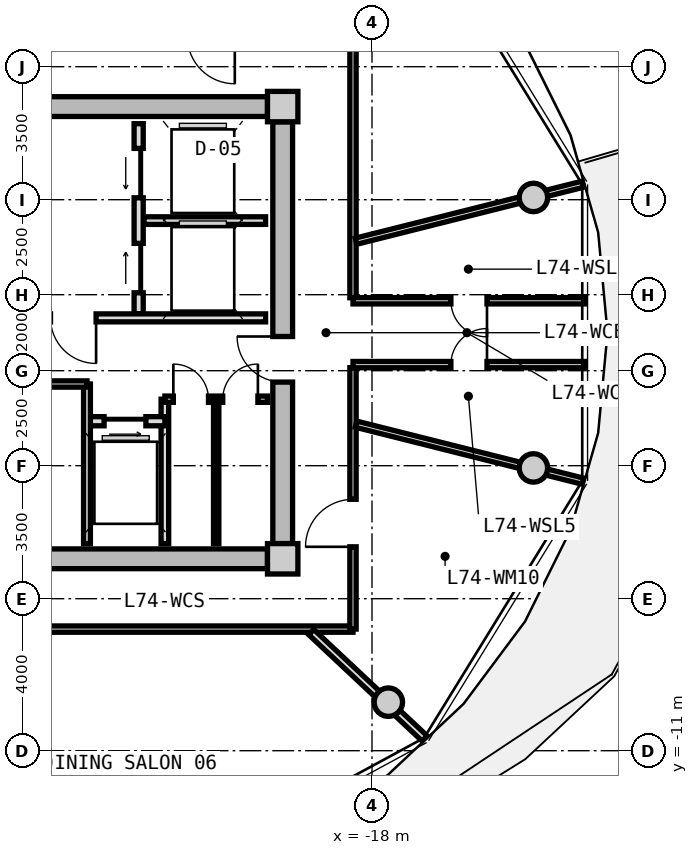
"""IFC4 building model, lengths in metres.
Left out: names, types, materials, properties, quantities, classifications, styles, units other than length and angle.
Written with IfcOpenShell. Run it as: python <this file> out.ifc"""

import sys

from ifc_helpers import new_model, si_unit, direction, frame, frame_2d, origin, origin_2d, place, context, subcontext, project, spatial, rectangle, circle, extrude, source, transform, mapped, element, fill, save


model = new_model("IFC4")
c1 = context("Model", 3, precision=1e-05, world=origin(), true_north=direction((0.0, 1.0)))
c2 = subcontext(c1, "Body", "Model", "MODEL_VIEW")
j1 = project(units=[si_unit("LENGTHUNIT", "METRE"), si_unit("PLANEANGLEUNIT", "RADIAN")], contexts=[c1])
p1 = place(None, origin())
s1 = spatial("IfcSite", under=j1, at=p1, CompositionType="ELEMENT")
p2 = place(p1, origin())
s2 = spatial("IfcBuilding", under=s1, at=p2, CompositionType="ELEMENT")
p3 = place(p2, frame((0.0, 0.0, 238.3)))
s3 = spatial("IfcBuildingStorey", under=s2, at=p3, CompositionType="ELEMENT", Elevation=238.3)
m1 = source(origin(), c2, "Body", "SweptSolid", [
    extrude(rectangle(XDim=0.8, YDim=0.8, at=origin_2d()), origin(), (0.0, 0.0, 1.0), 3.05),
])
for number, where, z_axis, x_axis in (
    (1, (-20.35, -5.95, 0.0), (0.0, 0.0, 1.0), (1.0, 0.0, 0.0)),
    (2, (-20.35, 5.95, 0.0), (0.0, 0.0, 1.0), (1.0, 0.0, 0.0)),
):
    element("IfcColumn", number, at=place(p3, frame(where, z_axis=z_axis, x_axis=x_axis)), inside=s3, PredefinedType="COLUMN", context=c2, shape_type="MappedRepresentation", body=[
        mapped(m1, transform((0.0, 0.0, 0.0), x_axis=(1.0, 0.0, 0.0), y_axis=(0.0, 1.0, 0.0), z_axis=(0.0, 0.0, 1.0), scale=1.0)),
    ])
m2 = source(origin(), c2, "Body", "SweptSolid", [
    extrude(rectangle(XDim=14.5, YDim=0.52, at=frame_2d((7.25, 0.0))), origin(), (0.0, 0.0, 1.0), 2.81),
])
for number, where, z_axis, x_axis in (
    (3, (-35.25, 5.95, 0.0), (0.0, 0.0, 1.0), (1.0, 0.0, 0.0)),
    (4, (-20.75, -5.95, 0.0), (0.0, 0.0, 1.0), (-1.0, 0.0, 0.0)),
):
    element("IfcWall", number, at=place(p3, frame(where, z_axis=z_axis, x_axis=x_axis)), inside=s3, PredefinedType="SHEAR", context=c2, shape_type="MappedRepresentation", body=[
        mapped(m2, transform((0.0, 0.0, 0.0), x_axis=(1.0, 0.0, 0.0), y_axis=(0.0, 1.0, 0.0), z_axis=(0.0, 0.0, 1.0), scale=1.0)),
    ])
m3 = source(origin(), c2, "Body", "SweptSolid", [
    extrude(rectangle(XDim=11.1, YDim=0.52, at=frame_2d((5.55, 0.0))), origin(), (0.0, 0.0, 1.0), 2.81),
])
p4 = place(p3, frame((-20.35, 5.55, 0.0), z_axis=(0.0, 0.0, 1.0), x_axis=(0.0, -1.0, 0.0)))
e5 = element("IfcWall", 5, at=p4, inside=s3, PredefinedType="SHEAR", context=c2, shape_type="MappedRepresentation", body=[
    mapped(m3, transform((0.0, 0.0, 0.0), x_axis=(1.0, 0.0, 0.0), y_axis=(0.0, 1.0, 0.0), z_axis=(0.0, 0.0, 1.0), scale=1.0)),
])
p5 = place(p4, frame((5.65, 0.0, 0.0)))
e6 = element("IfcOpeningElement", 6, at=p5, cuts=e5, PredefinedType="OPENING", context=c2, shape_type="SweptSolid", body=[
    extrude(rectangle(XDim=1.2, YDim=2.15, at=frame_2d((0.6, 1.075))), frame((0.0, 0.27, 0.0), z_axis=(0.0, -1.0, 0.0), x_axis=(1.0, 0.0, 0.0)), (0.0, 0.0, 1.0), 0.54),
])
m4 = source(origin(), c2, "Body", "SweptSolid", [
    extrude(circle(Radius=0.375, at=origin_2d()), origin(), (0.0, 0.0, 1.0), 3.05),
])
for number, where, z_axis, x_axis in (
    (7, (-13.753, 3.559, 0.0), (0.0, 0.0, 1.0), (1.0, 0.0, 0.0)),
    (8, (-17.57, -9.723, 0.0), (0.0, 0.0, 1.0), (1.0, 0.0, 0.0)),
    (9, (-13.753, -3.559, 0.0), (0.0, 0.0, 1.0), (1.0, 0.0, 0.0)),
):
    element("IfcColumn", number, at=place(p3, frame(where, z_axis=z_axis, x_axis=x_axis)), inside=s3, PredefinedType="COLUMN", context=c2, shape_type="MappedRepresentation", body=[
        mapped(m4, transform((0.0, 0.0, 0.0), x_axis=(1.0, 0.0, 0.0), y_axis=(0.0, 1.0, 0.0), z_axis=(0.0, 0.0, 1.0), scale=1.0)),
    ])
m5 = source(origin(), c2, "Body", "SweptSolid", [
    extrude(rectangle(XDim=5.0, YDim=0.24, at=frame_2d((2.5, 0.0))), origin(), (0.0, 0.0, 1.0), 2.795),
])
p6 = place(p3, frame((-24.14, 0.5, 0.0), z_axis=(0.0, 0.0, 1.0), x_axis=(0.0, 1.0, 0.0)))
e10 = element("IfcWall", 10, at=p6, inside=s3, PredefinedType="PARTITIONING", context=c2, shape_type="MappedRepresentation", body=[
    mapped(m5, transform((0.0, 0.0, 0.0), x_axis=(1.0, 0.0, 0.0), y_axis=(0.0, 1.0, 0.0), z_axis=(0.0, 0.0, 1.0), scale=1.0)),
])
p7 = place(p6, frame((3.05, 0.0, 0.0)))
e11 = element("IfcOpeningElement", 11, at=p7, cuts=e10, PredefinedType="OPENING", context=c2, shape_type="SweptSolid", body=[
    extrude(rectangle(XDim=1.3, YDim=2.2, at=frame_2d((0.65, 1.1))), frame((0.0, 0.13, 0.0), z_axis=(0.0, -1.0, 0.0), x_axis=(1.0, 0.0, 0.0)), (0.0, 0.0, 1.0), 0.26),
])
p8 = place(p6, frame((0.55, 0.0, 0.0)))
e12 = element("IfcOpeningElement", 12, at=p8, cuts=e10, PredefinedType="OPENING", context=c2, shape_type="SweptSolid", body=[
    extrude(rectangle(XDim=1.3, YDim=2.2, at=frame_2d((0.65, 1.1))), frame((0.0, 0.13, 0.0), z_axis=(0.0, -1.0, 0.0), x_axis=(1.0, 0.0, 0.0)), (0.0, 0.0, 1.0), 0.26),
])
m6 = source(origin(), c2, "Body", "SweptSolid", [
    extrude(rectangle(XDim=3.2, YDim=0.2, at=frame_2d((1.6, 0.0))), origin(), (0.0, 0.0, 1.0), 2.795),
])
p9 = place(p3, frame((-24.0, 2.95, 0.0), z_axis=(0.0, 0.0, 1.0), x_axis=(1.0, 0.0, 0.0)))
e13 = element("IfcWall", 13, at=p9, inside=s3, PredefinedType="PARTITIONING", context=c2, shape_type="MappedRepresentation", body=[
    mapped(m6, transform((0.0, 0.0, 0.0), x_axis=(1.0, 0.0, 0.0), y_axis=(0.0, 1.0, 0.0), z_axis=(0.0, 0.0, 1.0), scale=1.0)),
])
m7 = source(origin(), c2, "Body", "SweptSolid", [
    extrude(rectangle(XDim=6.66, YDim=0.21, at=frame_2d((3.33, 0.0))), origin(), (0.0, 0.0, 1.0), 2.795),
])
p10 = place(p3, frame((-27.46, 0.39, 0.0), z_axis=(0.0, 0.0, 1.0), x_axis=(1.0, 0.0, 0.0)))
e14 = element("IfcWall", 14, at=p10, inside=s3, PredefinedType="PARTITIONING", context=c2, shape_type="MappedRepresentation", body=[
    mapped(m7, transform((0.0, 0.0, 0.0), x_axis=(1.0, 0.0, 0.0), y_axis=(0.0, 1.0, 0.0), z_axis=(0.0, 0.0, 1.0), scale=1.0)),
])
p11 = place(p10, frame((1.0, 0.0, 0.0)))
e15 = element("IfcOpeningElement", 15, at=p11, cuts=e14, PredefinedType="OPENING", context=c2, shape_type="SweptSolid", body=[
    extrude(rectangle(XDim=1.2, YDim=2.15, at=frame_2d((0.6, 1.075))), frame((0.0, 0.115, 0.0), z_axis=(0.0, -1.0, 0.0), x_axis=(1.0, 0.0, 0.0)), (0.0, 0.0, 1.0), 0.23),
])
m8 = source(origin(), c2, "Body", "SweptSolid", [
    extrude(rectangle(XDim=3.8, YDim=0.2, at=frame_2d((1.9, 0.0))), origin(), (0.0, 0.0, 1.0), 2.795),
])
p12 = place(p3, frame((-23.45, -5.55, 0.0), z_axis=(0.0, 0.0, 1.0), x_axis=(0.0, 1.0, 0.0)))
e16 = element("IfcWall", 16, at=p12, inside=s3, PredefinedType="PARTITIONING", context=c2, shape_type="MappedRepresentation", body=[
    mapped(m8, transform((0.0, 0.0, 0.0), x_axis=(1.0, 0.0, 0.0), y_axis=(0.0, 1.0, 0.0), z_axis=(0.0, 0.0, 1.0), scale=1.0)),
])
m9 = source(origin(), c2, "Body", "SweptSolid", [
    extrude(rectangle(XDim=2.05, YDim=0.24, at=frame_2d((1.025, 0.0))), origin(), (0.0, 0.0, 1.0), 2.795),
])
p13 = place(p3, frame((-25.5, -2.33, 0.0), z_axis=(0.0, 0.0, 1.0), x_axis=(1.0, 0.0, 0.0)))
e17 = element("IfcWall", 17, at=p13, inside=s3, PredefinedType="PARTITIONING", context=c2, shape_type="MappedRepresentation", body=[
    mapped(m9, transform((0.0, 0.0, 0.0), x_axis=(1.0, 0.0, 0.0), y_axis=(0.0, 1.0, 0.0), z_axis=(0.0, 0.0, 1.0), scale=1.0)),
])
p14 = place(p13, frame((0.45, 0.0, 0.0)))
e18 = element("IfcOpeningElement", 18, at=p14, cuts=e17, PredefinedType="OPENING", context=c2, shape_type="SweptSolid", body=[
    extrude(rectangle(XDim=1.1, YDim=2.2, at=frame_2d((0.55, 1.1))), frame((0.0, 0.13, 0.0), z_axis=(0.0, -1.0, 0.0), x_axis=(1.0, 0.0, 0.0)), (0.0, 0.0, 1.0), 0.26),
])
m10 = source(origin(), c2, "Body", "SweptSolid", [
    extrude(rectangle(XDim=4.2, YDim=0.18, at=frame_2d((2.1, 0.0))), origin(), (0.0, 0.0, 1.0), 2.795),
])
p15 = place(p3, frame((-25.5, -5.55, 0.0), z_axis=(0.0, 0.0, 1.0), x_axis=(0.0, 1.0, 0.0)))
e19 = element("IfcWall", 19, at=p15, inside=s3, PredefinedType="PARTITIONING", context=c2, shape_type="MappedRepresentation", body=[
    mapped(m10, transform((0.0, 0.0, 0.0), x_axis=(1.0, 0.0, 0.0), y_axis=(0.0, 1.0, 0.0), z_axis=(0.0, 0.0, 1.0), scale=1.0)),
])
m11 = source(origin(), c2, "Body", "SweptSolid", [
    extrude(rectangle(XDim=4.77, YDim=0.165, at=frame_2d((2.385, 0.0))), origin(), (0.0, 0.0, 1.0), 2.795),
])
p16 = place(p3, frame((-30.27, -1.35, 0.0), z_axis=(0.0, 0.0, 1.0), x_axis=(1.0, 0.0, 0.0)))
e20 = element("IfcWall", 20, at=p16, inside=s3, PredefinedType="PARTITIONING", context=c2, shape_type="MappedRepresentation", body=[
    mapped(m11, transform((0.0, 0.0, 0.0), x_axis=(1.0, 0.0, 0.0), y_axis=(0.0, 1.0, 0.0), z_axis=(0.0, 0.0, 1.0), scale=1.0)),
])
p17 = place(p16, frame((1.85, 0.0, 0.0)))
e21 = element("IfcOpeningElement", 21, at=p17, cuts=e20, PredefinedType="OPENING", context=c2, shape_type="SweptSolid", body=[
    extrude(rectangle(XDim=1.0, YDim=2.1, at=frame_2d((0.5, 1.05))), frame((0.0, 0.093, 0.0), z_axis=(0.0, -1.0, 0.0), x_axis=(1.0, 0.0, 0.0)), (0.0, 0.0, 1.0), 0.185),
])
m12 = source(origin(), c2, "Body", "SweptSolid", [
    extrude(rectangle(XDim=2.7, YDim=0.165, at=frame_2d((1.35, 0.0))), origin(), (0.0, 0.0, 1.0), 2.795),
])
p18 = place(p3, frame((-23.45, -1.75, 0.0), z_axis=(0.0, 0.0, 1.0), x_axis=(1.0, 0.0, 0.0)))
e22 = element("IfcWall", 22, at=p18, inside=s3, PredefinedType="PARTITIONING", context=c2, shape_type="MappedRepresentation", body=[
    mapped(m12, transform((0.0, 0.0, 0.0), x_axis=(1.0, 0.0, 0.0), y_axis=(0.0, 1.0, 0.0), z_axis=(0.0, 0.0, 1.0), scale=1.0)),
])
p19 = place(p18, frame((0.222, 0.0, 0.0)))
e23 = element("IfcOpeningElement", 23, at=p19, cuts=e22, PredefinedType="OPENING", context=c2, shape_type="SweptSolid", body=[
    extrude(rectangle(XDim=0.925, YDim=2.1, at=frame_2d((0.462, 1.05))), frame((0.0, 0.093, 0.0), z_axis=(0.0, -1.0, 0.0), x_axis=(1.0, 0.0, 0.0)), (0.0, 0.0, 1.0), 0.185),
])
p20 = place(p18, frame((1.522, 0.0, 0.0)))
e24 = element("IfcOpeningElement", 24, at=p20, cuts=e22, PredefinedType="OPENING", context=c2, shape_type="SweptSolid", body=[
    extrude(rectangle(XDim=0.925, YDim=2.1, at=frame_2d((0.462, 1.05))), frame((0.0, 0.093, 0.0), z_axis=(0.0, -1.0, 0.0), x_axis=(1.0, 0.0, 0.0)), (0.0, 0.0, 1.0), 0.185),
])
m13 = source(origin(), c2, "Body", "SweptSolid", [
    extrude(rectangle(XDim=3.8, YDim=0.14, at=frame_2d((1.9, 0.0))), origin(), (0.0, 0.0, 1.0), 2.795),
])
p21 = place(p3, frame((-22.1, -5.55, 0.0), z_axis=(0.0, 0.0, 1.0), x_axis=(0.0, 1.0, 0.0)))
e25 = element("IfcWall", 25, at=p21, inside=s3, PredefinedType="PARTITIONING", context=c2, shape_type="MappedRepresentation", body=[
    mapped(m13, transform((0.0, 0.0, 0.0), x_axis=(1.0, 0.0, 0.0), y_axis=(0.0, 1.0, 0.0), z_axis=(0.0, 0.0, 1.0), scale=1.0)),
])
m14 = source(origin(), c2, "Body", "SweptSolid", [
    extrude(rectangle(XDim=19.0, YDim=0.165, at=frame_2d((9.5, 0.0))), origin(), (0.0, 0.0, 1.0), 2.795),
])
p22 = place(p3, frame((-18.5, -7.8, 0.0), z_axis=(0.0, 0.0, 1.0), x_axis=(-1.0, 0.0, 0.0)))
e26 = element("IfcWall", 26, at=p22, inside=s3, PredefinedType="PARTITIONING", context=c2, shape_type="MappedRepresentation", body=[
    mapped(m14, transform((0.0, 0.0, 0.0), x_axis=(1.0, 0.0, 0.0), y_axis=(0.0, 1.0, 0.0), z_axis=(0.0, 0.0, 1.0), scale=1.0)),
])
p23 = place(p22, frame((9.292, 0.0, 0.0)))
e27 = element("IfcOpeningElement", 27, at=p23, cuts=e26, PredefinedType="OPENING", context=c2, shape_type="SweptSolid", body=[
    extrude(rectangle(XDim=1.25, YDim=2.2, at=frame_2d((0.625, 1.1))), frame((0.0, 0.093, 0.0), z_axis=(0.0, -1.0, 0.0), x_axis=(1.0, 0.0, 0.0)), (0.0, 0.0, 1.0), 0.185),
])
m15 = source(origin(), c2, "Body", "SweptSolid", [
    extrude(rectangle(XDim=6.88, YDim=0.165, at=frame_2d((3.44, 0.0))), origin(), (0.0, 0.0, 1.0), 2.795),
])
p24 = place(p3, frame((-18.5, 7.8, 0.0), z_axis=(0.0, 0.0, 1.0), x_axis=(0.0, -1.0, 0.0)))
e28 = element("IfcWall", 28, at=p24, inside=s3, PredefinedType="PARTITIONING", context=c2, shape_type="MappedRepresentation", body=[
    mapped(m15, transform((0.0, 0.0, 0.0), x_axis=(1.0, 0.0, 0.0), y_axis=(0.0, 1.0, 0.0), z_axis=(0.0, 0.0, 1.0), scale=1.0)),
])
p25 = place(p3, frame((-18.5, -0.92, 0.0), z_axis=(0.0, 0.0, 1.0), x_axis=(0.0, -1.0, 0.0)))
e29 = element("IfcWall", 29, at=p25, inside=s3, PredefinedType="PARTITIONING", context=c2, shape_type="MappedRepresentation", body=[
    mapped(m15, transform((0.0, 0.0, 0.0), x_axis=(1.0, 0.0, 0.0), y_axis=(0.0, 1.0, 0.0), z_axis=(0.0, 0.0, 1.0), scale=1.0)),
])
p26 = place(p25, frame((3.464, 0.0, 0.0)))
e30 = element("IfcOpeningElement", 30, at=p26, cuts=e29, PredefinedType="OPENING", context=c2, shape_type="SweptSolid", body=[
    extrude(rectangle(XDim=1.25, YDim=2.2, at=frame_2d((0.625, 1.1))), frame((0.0, 0.093, 0.0), z_axis=(0.0, -1.0, 0.0), x_axis=(1.0, 0.0, 0.0)), (0.0, 0.0, 1.0), 0.185),
])
m16 = source(origin(), c2, "Body", "SweptSolid", [
    extrude(rectangle(XDim=6.157, YDim=0.165, at=frame_2d((3.079, 0.0))), origin(), (0.0, 0.0, 1.0), 2.395),
])
for number, where, z_axis, x_axis in (
    (31, (-18.42, -2.407, 0.0), (0.0, 0.0, 1.0), (0.97, -0.244, 0.0)),
    (32, (-18.42, 2.407, 0.0), (0.0, 0.0, 1.0), (0.97, 0.244, 0.0)),
):
    element("IfcWall", number, at=place(p3, frame(where, z_axis=z_axis, x_axis=x_axis)), inside=s3, PredefinedType="PARTITIONING", context=c2, shape_type="MappedRepresentation", body=[
        mapped(m16, transform((0.0, 0.0, 0.0), x_axis=(1.0, 0.0, 0.0), y_axis=(0.0, 1.0, 0.0), z_axis=(0.0, 0.0, 1.0), scale=1.0)),
    ])
m17 = source(origin(), c2, "Body", "SweptSolid", [
    extrude(rectangle(XDim=6.101, YDim=0.165, at=frame_2d((3.051, 0.0))), origin(), (0.0, 0.0, 1.0), 2.795),
])
p27 = place(p3, frame((-18.5, 0.84, 0.0), z_axis=(0.0, 0.0, 1.0), x_axis=(1.0, 0.0, 0.0)))
e33 = element("IfcWall", 33, at=p27, inside=s3, PredefinedType="PARTITIONING", context=c2, shape_type="MappedRepresentation", body=[
    mapped(m17, transform((0.0, 0.0, 0.0), x_axis=(1.0, 0.0, 0.0), y_axis=(0.0, 1.0, 0.0), z_axis=(0.0, 0.0, 1.0), scale=1.0)),
])
p28 = place(p27, frame((2.576, 0.0, 0.0)))
e34 = element("IfcOpeningElement", 34, at=p28, cuts=e33, PredefinedType="OPENING", context=c2, shape_type="SweptSolid", body=[
    extrude(rectangle(XDim=0.95, YDim=2.1, at=frame_2d((0.475, 1.05))), frame((0.0, 0.093, 0.0), z_axis=(0.0, -1.0, 0.0), x_axis=(1.0, 0.0, 0.0)), (0.0, 0.0, 1.0), 0.185),
])
p29 = place(p3, frame((-12.399, -0.84, 0.0), z_axis=(0.0, 0.0, 1.0), x_axis=(-1.0, 0.0, 0.0)))
e35 = element("IfcWall", 35, at=p29, inside=s3, PredefinedType="PARTITIONING", context=c2, shape_type="MappedRepresentation", body=[
    mapped(m17, transform((0.0, 0.0, 0.0), x_axis=(1.0, 0.0, 0.0), y_axis=(0.0, 1.0, 0.0), z_axis=(0.0, 0.0, 1.0), scale=1.0)),
])
p30 = place(p29, frame((2.576, 0.0, 0.0)))
e36 = element("IfcOpeningElement", 36, at=p30, cuts=e35, PredefinedType="OPENING", context=c2, shape_type="SweptSolid", body=[
    extrude(rectangle(XDim=0.95, YDim=2.1, at=frame_2d((0.475, 1.05))), frame((0.0, 0.093, 0.0), z_axis=(0.0, -1.0, 0.0), x_axis=(1.0, 0.0, 0.0)), (0.0, 0.0, 1.0), 0.185),
])
m18 = source(origin(), c2, "Body", "SweptSolid", [
    extrude(rectangle(XDim=4.089, YDim=0.19, at=frame_2d((2.044, 0.0))), origin(), (0.0, 0.0, 1.0), 2.395),
])
p31 = place(p3, frame((-19.598, -7.88, 0.0), z_axis=(0.0, 0.0, 1.0), x_axis=(0.729401273609, -0.684086092577, 0.0)))
e37 = element("IfcWall", 37, at=p31, inside=s3, PredefinedType="PARTITIONING", context=c2, shape_type="MappedRepresentation", body=[
    mapped(m18, transform((0.0, 0.0, 0.0), x_axis=(1.0, 0.0, 0.0), y_axis=(0.0, 1.0, 0.0), z_axis=(0.0, 0.0, 1.0), scale=1.0)),
])
m19 = source(origin(), c2, "Body", "SweptSolid", [
    extrude(rectangle(XDim=1.3, YDim=2.2, at=frame_2d((0.65, 1.1))), frame((0.0, 0.025, 0.0), z_axis=(0.0, -1.0, 0.0), x_axis=(1.0, 0.0, 0.0)), (0.0, 0.0, 1.0), 0.05),
])
p32 = place(p7, origin())
e38 = element("IfcDoor", 38, at=p32, inside=s3, OperationType="SLIDING_TO_LEFT", PredefinedType="DOOR", context=c2, shape_type="MappedRepresentation", body=[
    mapped(m19, transform((0.0, 0.0, 0.0), x_axis=(1.0, 0.0, 0.0), y_axis=(0.0, 1.0, 0.0), z_axis=(0.0, 0.0, 1.0), scale=1.0)),
])
fill(e11, e38)
p33 = place(p8, origin())
e39 = element("IfcDoor", 39, at=p33, inside=s3, OperationType="SLIDING_TO_RIGHT", PredefinedType="DOOR", context=c2, shape_type="MappedRepresentation", body=[
    mapped(m19, transform((0.0, 0.0, 0.0), x_axis=(1.0, 0.0, 0.0), y_axis=(0.0, 1.0, 0.0), z_axis=(0.0, 0.0, 1.0), scale=1.0)),
])
fill(e12, e39)
m20 = source(origin(), c2, "Body", "SweptSolid", [
    extrude(rectangle(XDim=1.2, YDim=2.15, at=frame_2d((0.6, 1.075))), frame((0.0, 0.025, 0.0), z_axis=(0.0, -1.0, 0.0), x_axis=(1.0, 0.0, 0.0)), (0.0, 0.0, 1.0), 0.05),
])
p34 = place(p11, frame((1.2, 0.0, 0.0), z_axis=(0.0, 0.0, 1.0), x_axis=(-1.0, 0.0, 0.0)))
e40 = element("IfcDoor", 40, at=p34, inside=s3, OperationType="SINGLE_SWING_LEFT", PredefinedType="DOOR", context=c2, shape_type="MappedRepresentation", body=[
    mapped(m20, transform((0.0, 0.0, 0.0), x_axis=(1.0, 0.0, 0.0), y_axis=(0.0, 1.0, 0.0), z_axis=(0.0, 0.0, 1.0), scale=1.0)),
])
fill(e15, e40)
p35 = place(p5, frame((1.2, 0.0, 0.0), z_axis=(0.0, 0.0, 1.0), x_axis=(-1.0, 0.0, 0.0)))
e41 = element("IfcDoor", 41, at=p35, inside=s3, OperationType="SINGLE_SWING_RIGHT", PredefinedType="DOOR", context=c2, shape_type="MappedRepresentation", body=[
    mapped(m20, transform((0.0, 0.0, 0.0), x_axis=(1.0, 0.0, 0.0), y_axis=(0.0, 1.0, 0.0), z_axis=(0.0, 0.0, 1.0), scale=1.0)),
])
fill(e6, e41)
m21 = source(origin(), c2, "Body", "SweptSolid", [
    extrude(rectangle(XDim=1.1, YDim=2.2, at=frame_2d((0.55, 1.1))), frame((0.0, 0.025, 0.0), z_axis=(0.0, -1.0, 0.0), x_axis=(1.0, 0.0, 0.0)), (0.0, 0.0, 1.0), 0.05),
])
p36 = place(p14, frame((1.1, 0.0, 0.0), z_axis=(0.0, 0.0, 1.0), x_axis=(-1.0, 0.0, 0.0)))
e42 = element("IfcDoor", 42, at=p36, inside=s3, OperationType="SLIDING_TO_RIGHT", PredefinedType="DOOR", context=c2, shape_type="MappedRepresentation", body=[
    mapped(m21, transform((0.0, 0.0, 0.0), x_axis=(1.0, 0.0, 0.0), y_axis=(0.0, 1.0, 0.0), z_axis=(0.0, 0.0, 1.0), scale=1.0)),
])
fill(e18, e42)
m22 = source(origin(), c2, "Body", "SweptSolid", [
    extrude(rectangle(XDim=0.925, YDim=2.1, at=frame_2d((0.462, 1.05))), frame((0.0, 0.025, 0.0), z_axis=(0.0, -1.0, 0.0), x_axis=(1.0, 0.0, 0.0)), (0.0, 0.0, 1.0), 0.05),
])
p37 = place(p19, origin())
e43 = element("IfcDoor", 43, at=p37, inside=s3, OperationType="SINGLE_SWING_LEFT", PredefinedType="DOOR", context=c2, shape_type="MappedRepresentation", body=[
    mapped(m22, transform((0.0, 0.0, 0.0), x_axis=(1.0, 0.0, 0.0), y_axis=(0.0, 1.0, 0.0), z_axis=(0.0, 0.0, 1.0), scale=1.0)),
])
fill(e23, e43)
p38 = place(p20, origin())
e44 = element("IfcDoor", 44, at=p38, inside=s3, OperationType="SINGLE_SWING_RIGHT", PredefinedType="DOOR", context=c2, shape_type="MappedRepresentation", body=[
    mapped(m22, transform((0.0, 0.0, 0.0), x_axis=(1.0, 0.0, 0.0), y_axis=(0.0, 1.0, 0.0), z_axis=(0.0, 0.0, 1.0), scale=1.0)),
])
fill(e24, e44)
m23 = source(origin(), c2, "Body", "SweptSolid", [
    extrude(rectangle(XDim=0.95, YDim=2.1, at=frame_2d((0.475, 1.05))), frame((0.0, 0.025, 0.0), z_axis=(0.0, -1.0, 0.0), x_axis=(1.0, 0.0, 0.0)), (0.0, 0.0, 1.0), 0.05),
])
p39 = place(p30, frame((0.95, 0.0, 0.0), z_axis=(0.0, 0.0, 1.0), x_axis=(-1.0, 0.0, 0.0)))
e45 = element("IfcDoor", 45, at=p39, inside=s3, OperationType="SINGLE_SWING_RIGHT", PredefinedType="DOOR", context=c2, shape_type="MappedRepresentation", body=[
    mapped(m23, transform((0.0, 0.0, 0.0), x_axis=(1.0, 0.0, 0.0), y_axis=(0.0, 1.0, 0.0), z_axis=(0.0, 0.0, 1.0), scale=1.0)),
])
fill(e36, e45)
p40 = place(p28, frame((0.95, 0.0, 0.0), z_axis=(0.0, 0.0, 1.0), x_axis=(-1.0, 0.0, 0.0)))
e46 = element("IfcDoor", 46, at=p40, inside=s3, OperationType="SINGLE_SWING_LEFT", PredefinedType="DOOR", context=c2, shape_type="MappedRepresentation", body=[
    mapped(m23, transform((0.0, 0.0, 0.0), x_axis=(1.0, 0.0, 0.0), y_axis=(0.0, 1.0, 0.0), z_axis=(0.0, 0.0, 1.0), scale=1.0)),
])
fill(e34, e46)
m24 = source(origin(), c2, "Body", "SweptSolid", [
    extrude(rectangle(XDim=1.25, YDim=2.2, at=frame_2d((0.625, 1.1))), frame((0.0, 0.025, 0.0), z_axis=(0.0, -1.0, 0.0), x_axis=(1.0, 0.0, 0.0)), (0.0, 0.0, 1.0), 0.05),
])
p41 = place(p26, frame((1.25, 0.0, 0.0), z_axis=(0.0, 0.0, 1.0), x_axis=(-1.0, 0.0, 0.0)))
e47 = element("IfcDoor", 47, at=p41, inside=s3, OperationType="SINGLE_SWING_LEFT", PredefinedType="DOOR", context=c2, shape_type="MappedRepresentation", body=[
    mapped(m24, transform((0.0, 0.0, 0.0), x_axis=(1.0, 0.0, 0.0), y_axis=(0.0, 1.0, 0.0), z_axis=(0.0, 0.0, 1.0), scale=1.0)),
])
fill(e30, e47)
save(model, sys.argv[1])
